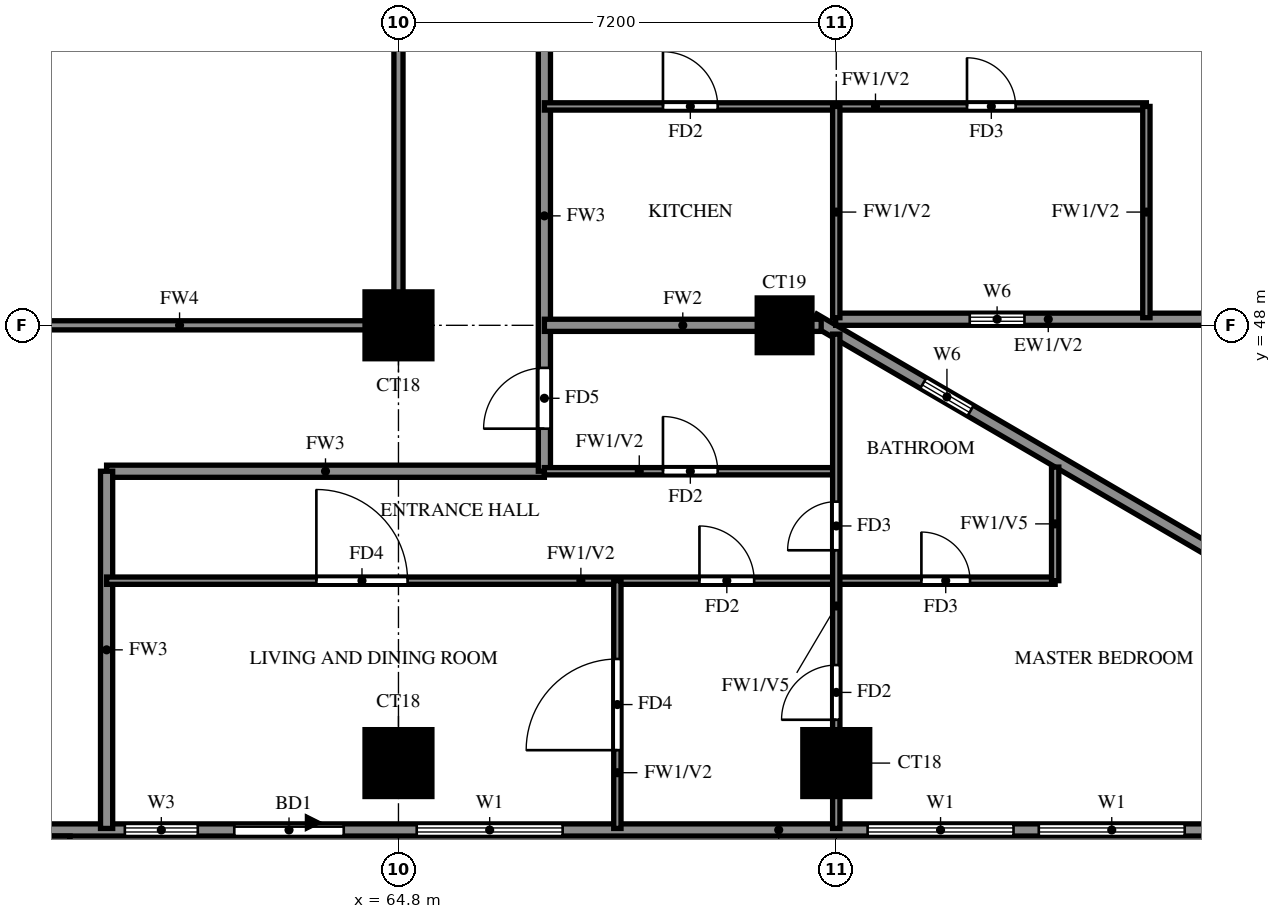
"""IFC4 building model, lengths in metres.
Left out: names, types, materials, properties, quantities, classifications, styles, units other than length and angle.
Written with IfcOpenShell. Run it as: python <this file> out.ifc"""

import sys

from ifc_helpers import new_model, si_unit, direction, frame, frame_2d, origin, origin_2d, place, context, subcontext, project, spatial, rectangle, extrude, source, transform, mapped, element, fill, save


model = new_model("IFC4")
c1 = context("Model", 3, precision=1e-05, world=origin(), true_north=direction((0.0, 1.0)))
c2 = subcontext(c1, "Body", "Model", "MODEL_VIEW")
j1 = project(units=[si_unit("LENGTHUNIT", "METRE"), si_unit("PLANEANGLEUNIT", "RADIAN")], contexts=[c1])
p1 = place(None, origin())
s1 = spatial("IfcSite", under=j1, at=p1, CompositionType="ELEMENT")
p2 = place(p1, origin())
s2 = spatial("IfcBuilding", under=s1, at=p2, CompositionType="ELEMENT")
p3 = place(p2, frame((0.0, 0.0, 113.0)))
s3 = spatial("IfcBuildingStorey", under=s2, at=p3, CompositionType="ELEMENT", Elevation=113.0)
m1 = source(origin(), c2, "Body", "SweptSolid", [
    extrude(rectangle(XDim=1.1, YDim=1.1, at=origin_2d()), origin(), (0.0, 0.0, 1.0), 3.2),
])
for number, where, z_axis, x_axis in (
    (1, (64.8, 40.8, 0.0), (0.0, 0.0, 1.0), (1.0, 0.0, 0.0)),
    (2, (72.0, 40.8, 0.0), (0.0, 0.0, 1.0), (1.0, 0.0, 0.0)),
    (3, (64.8, 48.0, 0.0), (0.0, 0.0, 1.0), (1.0, 0.0, 0.0)),
):
    element("IfcColumn", number, at=place(p3, frame(where, z_axis=z_axis, x_axis=x_axis)), inside=s3, PredefinedType="COLUMN", context=c2, shape_type="MappedRepresentation", body=[
        mapped(m1, transform((0.0, 0.0, 0.0))),
    ])
m2 = source(origin(), c2, "Body", "SweptSolid", [
    extrude(rectangle(XDim=0.9, YDim=0.9, at=origin_2d()), origin(), (0.0, 0.0, 1.0), 3.2),
])
p4 = place(p3, frame((71.15, 48.0, 0.0), z_axis=(0.0, 0.0, 1.0), x_axis=(1.0, 0.0, 0.0)))
e4 = element("IfcColumn", 4, at=p4, inside=s3, PredefinedType="COLUMN", context=c2, shape_type="MappedRepresentation", body=[
    mapped(m2, transform((0.0, 0.0, 0.0))),
])
p5 = place(p3, frame((85.719, 39.881, 0.0), z_axis=(0.0, 0.0, 1.0), x_axis=(-0.86377618652, 0.503875678716, 0.0)))
e5 = element("IfcWall", 5, at=p5, inside=s3, PredefinedType="SOLIDWALL", context=c2, shape_type="SweptSolid", body=[
    extrude(rectangle(XDim=16.311, YDim=0.2, at=frame_2d((8.156, 0.0))), origin(), (0.0, 0.0, 1.0), 3.2),
])
p6 = place(p5, frame((13.326, 0.0, 1.5)))
e6 = element("IfcOpeningElement", 6, at=p6, cuts=e5, PredefinedType="OPENING", context=c2, shape_type="SweptSolid", body=[
    extrude(rectangle(XDim=0.9, YDim=0.9, at=frame_2d((0.45, 0.45))), frame((0.0, 0.11, 0.0), z_axis=(0.0, -1.0, 0.0), x_axis=(1.0, 0.0, 0.0)), (0.0, 0.0, 1.0), 0.22),
])
p7 = place(p3, frame((71.99, 48.1, 0.0), z_axis=(0.0, 0.0, 1.0), x_axis=(1.0, 0.0, 0.0)))
e7 = element("IfcWall", 7, at=p7, inside=s3, PredefinedType="SOLIDWALL", context=c2, shape_type="SweptSolid", body=[
    extrude(rectangle(XDim=6.66, YDim=0.2, at=frame_2d((3.33, 0.0))), origin(), (0.0, 0.0, 1.0), 3.2),
])
p8 = place(p7, frame((2.205, 0.0, 1.5)))
e8 = element("IfcOpeningElement", 8, at=p8, cuts=e7, PredefinedType="OPENING", context=c2, shape_type="SweptSolid", body=[
    extrude(rectangle(XDim=0.9, YDim=0.9, at=frame_2d((0.45, 0.45))), frame((0.0, 0.11, 0.0), z_axis=(0.0, -1.0, 0.0), x_axis=(1.0, 0.0, 0.0)), (0.0, 0.0, 1.0), 0.22),
])
p9 = place(p3, frame((58.8, 39.7, 0.0), z_axis=(0.0, 0.0, 1.0), x_axis=(1.0, 0.0, 0.0)))
e9 = element("IfcWall", 9, at=p9, inside=s3, PredefinedType="SOLIDWALL", context=c2, shape_type="SweptSolid", body=[
    extrude(rectangle(XDim=27.23, YDim=0.2, at=frame_2d((13.615, 0.0))), origin(), (0.0, 0.0, 1.0), 3.2),
])
p10 = place(p9, frame((3.3, 0.0, 0.0)))
e10 = element("IfcOpeningElement", 10, at=p10, cuts=e9, PredefinedType="OPENING", context=c2, shape_type="SweptSolid", body=[
    extrude(rectangle(XDim=1.8, YDim=2.4, at=frame_2d((0.9, 1.2))), frame((0.0, 0.11, 0.0), z_axis=(0.0, -1.0, 0.0), x_axis=(1.0, 0.0, 0.0)), (0.0, 0.0, 1.0), 0.22),
])
p11 = place(p9, frame((1.5, 0.0, 0.6)))
e11 = element("IfcOpeningElement", 11, at=p11, cuts=e9, PredefinedType="OPENING", context=c2, shape_type="SweptSolid", body=[
    extrude(rectangle(XDim=1.2, YDim=2.4, at=frame_2d((0.6, 1.2))), frame((0.0, 0.11, 0.0), z_axis=(0.0, -1.0, 0.0), x_axis=(1.0, 0.0, 0.0)), (0.0, 0.0, 1.0), 0.22),
])
p12 = place(p9, frame((6.3, 0.0, 0.6)))
e12 = element("IfcOpeningElement", 12, at=p12, cuts=e9, PredefinedType="OPENING", context=c2, shape_type="SweptSolid", body=[
    extrude(rectangle(XDim=2.4, YDim=2.4, at=frame_2d((1.2, 1.2))), frame((0.0, 0.11, 0.0), z_axis=(0.0, -1.0, 0.0), x_axis=(1.0, 0.0, 0.0)), (0.0, 0.0, 1.0), 0.22),
])
p13 = place(p9, frame((13.715, 0.0, 0.6)))
e13 = element("IfcOpeningElement", 13, at=p13, cuts=e9, PredefinedType="OPENING", context=c2, shape_type="SweptSolid", body=[
    extrude(rectangle(XDim=2.4, YDim=2.4, at=frame_2d((1.2, 1.2))), frame((0.0, 0.11, 0.0), z_axis=(0.0, -1.0, 0.0), x_axis=(1.0, 0.0, 0.0)), (0.0, 0.0, 1.0), 0.22),
])
p14 = place(p9, frame((16.531, 0.0, 0.6)))
e14 = element("IfcOpeningElement", 14, at=p14, cuts=e9, PredefinedType="OPENING", context=c2, shape_type="SweptSolid", body=[
    extrude(rectangle(XDim=2.4, YDim=2.4, at=frame_2d((1.2, 1.2))), frame((0.0, 0.11, 0.0), z_axis=(0.0, -1.0, 0.0), x_axis=(1.0, 0.0, 0.0)), (0.0, 0.0, 1.0), 0.22),
])
p15 = place(p9, frame((19.346, 0.0, 0.6)))
e15 = element("IfcOpeningElement", 15, at=p15, cuts=e9, PredefinedType="OPENING", context=c2, shape_type="SweptSolid", body=[
    extrude(rectangle(XDim=2.4, YDim=2.4, at=frame_2d((1.2, 1.2))), frame((0.0, 0.11, 0.0), z_axis=(0.0, -1.0, 0.0), x_axis=(1.0, 0.0, 0.0)), (0.0, 0.0, 1.0), 0.22),
])
p16 = place(p9, frame((22.161, 0.0, 0.6)))
e16 = element("IfcOpeningElement", 16, at=p16, cuts=e9, PredefinedType="OPENING", context=c2, shape_type="SweptSolid", body=[
    extrude(rectangle(XDim=2.4, YDim=2.4, at=frame_2d((1.2, 1.2))), frame((0.0, 0.11, 0.0), z_axis=(0.0, -1.0, 0.0), x_axis=(1.0, 0.0, 0.0)), (0.0, 0.0, 1.0), 0.22),
])
p17 = place(p9, frame((26.003, 0.0, 0.6)))
e17 = element("IfcOpeningElement", 17, at=p17, cuts=e9, PredefinedType="OPENING", context=c2, shape_type="SweptSolid", body=[
    extrude(rectangle(XDim=0.9, YDim=2.4, at=frame_2d((0.45, 1.2))), frame((0.0, 0.11, 0.0), z_axis=(0.0, -1.0, 0.0), x_axis=(1.0, 0.0, 0.0)), (0.0, 0.0, 1.0), 0.22),
])
p18 = place(p3, frame((58.5, 37.2, 0.0), z_axis=(0.0, 0.0, 1.0), x_axis=(0.0, 1.0, 0.0)))
e18 = element("IfcWall", 18, at=p18, inside=s3, PredefinedType="SOLIDWALL", context=c2, shape_type="SweptSolid", body=[
    extrude(rectangle(XDim=2.4, YDim=1.8, at=frame_2d((1.2, 0.0))), origin(), (0.0, 0.0, 1.0), 3.2),
])
p19 = place(p3, frame((60.0, 45.6, 0.0), z_axis=(0.0, 0.0, 1.0), x_axis=(1.0, 0.0, 0.0)))
e19 = element("IfcWall", 19, at=p19, inside=s3, PredefinedType="SOLIDWALL", context=c2, shape_type="SweptSolid", body=[
    extrude(rectangle(XDim=7.2, YDim=0.2, at=frame_2d((3.6, 0.0))), origin(), (0.0, 0.0, 1.0), 3.2),
])
p20 = place(p3, frame((60.0, 39.725, 0.0), z_axis=(0.0, 0.0, 1.0), x_axis=(0.0, 1.0, 0.0)))
e20 = element("IfcWall", 20, at=p20, inside=s3, PredefinedType="SOLIDWALL", context=c2, shape_type="SweptSolid", body=[
    extrude(rectangle(XDim=5.875, YDim=0.2, at=frame_2d((2.938, 0.0))), origin(), (0.0, 0.0, 1.0), 3.2),
])
p21 = place(p3, frame((67.2, 45.6, 0.0), z_axis=(0.0, 0.0, 1.0), x_axis=(0.0, 1.0, 0.0)))
e21 = element("IfcWall", 21, at=p21, inside=s3, PredefinedType="SOLIDWALL", context=c2, shape_type="SweptSolid", body=[
    extrude(rectangle(XDim=8.4, YDim=0.2, at=frame_2d((4.2, 0.0))), origin(), (0.0, 0.0, 1.0), 3.2),
])
p22 = place(p21, frame((0.7, 0.0, 0.0)))
e22 = element("IfcOpeningElement", 22, at=p22, cuts=e21, PredefinedType="OPENING", context=c2, shape_type="SweptSolid", body=[
    extrude(rectangle(XDim=1.0, YDim=2.1, at=frame_2d((0.5, 1.05))), frame((0.0, 0.11, 0.0), z_axis=(0.0, -1.0, 0.0), x_axis=(1.0, 0.0, 0.0)), (0.0, 0.0, 1.0), 0.22),
])
p23 = place(p3, frame((67.2, 48.0, 0.0), z_axis=(0.0, 0.0, 1.0), x_axis=(1.0, 0.0, 0.0)))
e23 = element("IfcWall", 23, at=p23, inside=s3, PredefinedType="SOLIDWALL", context=c2, shape_type="SweptSolid", body=[
    extrude(rectangle(XDim=4.552, YDim=0.2, at=frame_2d((2.276, 0.0))), origin(), (0.0, 0.0, 1.0), 3.2),
])
p24 = place(p3, frame((60.0, 43.8, 0.0), z_axis=(0.0, 0.0, 1.0), x_axis=(1.0, 0.0, 0.0)))
e24 = element("IfcWall", 24, at=p24, inside=s3, PredefinedType="PARTITIONING", context=c2, shape_type="SweptSolid", body=[
    extrude(rectangle(XDim=15.6, YDim=0.12, at=frame_2d((7.8, 0.0))), origin(), (0.0, 0.0, 1.0), 3.2),
])
p25 = place(p24, frame((9.75, 0.0, 0.0)))
e25 = element("IfcOpeningElement", 25, at=p25, cuts=e24, PredefinedType="OPENING", context=c2, shape_type="SweptSolid", body=[
    extrude(rectangle(XDim=0.9, YDim=2.1, at=frame_2d((0.45, 1.05))), frame((0.0, 0.07, 0.0), z_axis=(0.0, -1.0, 0.0), x_axis=(1.0, 0.0, 0.0)), (0.0, 0.0, 1.0), 0.14),
])
p26 = place(p24, frame((3.45, 0.0, 0.0)))
e26 = element("IfcOpeningElement", 26, at=p26, cuts=e24, PredefinedType="OPENING", context=c2, shape_type="SweptSolid", body=[
    extrude(rectangle(XDim=1.5, YDim=2.1, at=frame_2d((0.75, 1.05))), frame((0.0, 0.07, 0.0), z_axis=(0.0, -1.0, 0.0), x_axis=(1.0, 0.0, 0.0)), (0.0, 0.0, 1.0), 0.14),
])
p27 = place(p24, frame((13.4, 0.0, 0.0)))
e27 = element("IfcOpeningElement", 27, at=p27, cuts=e24, PredefinedType="OPENING", context=c2, shape_type="SweptSolid", body=[
    extrude(rectangle(XDim=0.8, YDim=2.1, at=frame_2d((0.4, 1.05))), frame((0.0, 0.07, 0.0), z_axis=(0.0, -1.0, 0.0), x_axis=(1.0, 0.0, 0.0)), (0.0, 0.0, 1.0), 0.14),
])
p28 = place(p3, frame((67.2, 45.6, 0.0), z_axis=(0.0, 0.0, 1.0), x_axis=(1.0, 0.0, 0.0)))
e28 = element("IfcWall", 28, at=p28, inside=s3, PredefinedType="PARTITIONING", context=c2, shape_type="SweptSolid", body=[
    extrude(rectangle(XDim=4.8, YDim=0.12, at=frame_2d((2.4, 0.0))), origin(), (0.0, 0.0, 1.0), 3.2),
])
p29 = place(p28, frame((1.95, 0.0, 0.0)))
e29 = element("IfcOpeningElement", 29, at=p29, cuts=e28, PredefinedType="OPENING", context=c2, shape_type="SweptSolid", body=[
    extrude(rectangle(XDim=0.9, YDim=2.1, at=frame_2d((0.45, 1.05))), frame((0.0, 0.07, 0.0), z_axis=(0.0, -1.0, 0.0), x_axis=(1.0, 0.0, 0.0)), (0.0, 0.0, 1.0), 0.14),
])
p30 = place(p3, frame((67.2, 51.6, 0.0), z_axis=(0.0, 0.0, 1.0), x_axis=(1.0, 0.0, 0.0)))
e30 = element("IfcWall", 30, at=p30, inside=s3, PredefinedType="PARTITIONING", context=c2, shape_type="SweptSolid", body=[
    extrude(rectangle(XDim=9.9, YDim=0.12, at=frame_2d((4.95, 0.0))), origin(), (0.0, 0.0, 1.0), 3.2),
])
p31 = place(p30, frame((6.95, 0.0, 0.0)))
e31 = element("IfcOpeningElement", 31, at=p31, cuts=e30, PredefinedType="OPENING", context=c2, shape_type="SweptSolid", body=[
    extrude(rectangle(XDim=0.8, YDim=2.1, at=frame_2d((0.4, 1.05))), frame((0.0, 0.07, 0.0), z_axis=(0.0, -1.0, 0.0), x_axis=(1.0, 0.0, 0.0)), (0.0, 0.0, 1.0), 0.14),
])
p32 = place(p30, frame((1.95, 0.0, 0.0)))
e32 = element("IfcOpeningElement", 32, at=p32, cuts=e30, PredefinedType="OPENING", context=c2, shape_type="SweptSolid", body=[
    extrude(rectangle(XDim=0.9, YDim=2.1, at=frame_2d((0.45, 1.05))), frame((0.0, 0.07, 0.0), z_axis=(0.0, -1.0, 0.0), x_axis=(1.0, 0.0, 0.0)), (0.0, 0.0, 1.0), 0.14),
])
p33 = place(p3, frame((68.4, 39.725, 0.0), z_axis=(0.0, 0.0, 1.0), x_axis=(0.0, 1.0, 0.0)))
e33 = element("IfcWall", 33, at=p33, inside=s3, PredefinedType="PARTITIONING", context=c2, shape_type="SweptSolid", body=[
    extrude(rectangle(XDim=4.075, YDim=0.12, at=frame_2d((2.038, 0.0))), origin(), (0.0, 0.0, 1.0), 3.2),
])
p34 = place(p33, frame((1.288, 0.0, 0.0)))
e34 = element("IfcOpeningElement", 34, at=p34, cuts=e33, PredefinedType="OPENING", context=c2, shape_type="SweptSolid", body=[
    extrude(rectangle(XDim=1.5, YDim=2.1, at=frame_2d((0.75, 1.05))), frame((0.0, 0.07, 0.0), z_axis=(0.0, -1.0, 0.0), x_axis=(1.0, 0.0, 0.0)), (0.0, 0.0, 1.0), 0.14),
])
p35 = place(p3, frame((72.0, 39.725, 0.0), z_axis=(0.0, 0.0, 1.0), x_axis=(0.0, 1.0, 0.0)))
e35 = element("IfcWall", 35, at=p35, inside=s3, PredefinedType="PARTITIONING", context=c2, shape_type="SweptSolid", body=[
    extrude(rectangle(XDim=8.13, YDim=0.12, at=frame_2d((4.065, 0.0))), origin(), (0.0, 0.0, 1.0), 2.3),
])
p36 = place(p35, frame((1.788, 0.0, 0.0)))
e36 = element("IfcOpeningElement", 36, at=p36, cuts=e35, PredefinedType="OPENING", context=c2, shape_type="SweptSolid", body=[
    extrude(rectangle(XDim=0.9, YDim=2.1, at=frame_2d((0.45, 1.05))), frame((0.0, 0.07, 0.0), z_axis=(0.0, -1.0, 0.0), x_axis=(1.0, 0.0, 0.0)), (0.0, 0.0, 1.0), 0.14),
])
p37 = place(p35, frame((4.575, 0.0, 0.0)))
e37 = element("IfcOpeningElement", 37, at=p37, cuts=e35, PredefinedType="OPENING", context=c2, shape_type="SweptSolid", body=[
    extrude(rectangle(XDim=0.8, YDim=2.1, at=frame_2d((0.4, 1.05))), frame((0.0, 0.07, 0.0), z_axis=(0.0, -1.0, 0.0), x_axis=(1.0, 0.0, 0.0)), (0.0, 0.0, 1.0), 0.14),
])
p38 = place(p3, frame((72.0, 48.125, 0.0), z_axis=(0.0, 0.0, 1.0), x_axis=(0.0, 1.0, 0.0)))
e38 = element("IfcWall", 38, at=p38, inside=s3, PredefinedType="PARTITIONING", context=c2, shape_type="SweptSolid", body=[
    extrude(rectangle(XDim=3.475, YDim=0.12, at=frame_2d((1.738, 0.0))), origin(), (0.0, 0.0, 1.0), 3.2),
])
p39 = place(p3, frame((75.6, 43.8, 0.0), z_axis=(0.0, 0.0, 1.0), x_axis=(0.0, 1.0, 0.0)))
e39 = element("IfcWall", 39, at=p39, inside=s3, PredefinedType="PARTITIONING", context=c2, shape_type="SweptSolid", body=[
    extrude(rectangle(XDim=1.868, YDim=0.12, at=frame_2d((0.934, 0.0))), origin(), (0.0, 0.0, 1.0), 2.3),
])
p40 = place(p3, frame((77.1, 48.125, 0.0), z_axis=(0.0, 0.0, 1.0), x_axis=(0.0, 1.0, 0.0)))
e40 = element("IfcWall", 40, at=p40, inside=s3, PredefinedType="PARTITIONING", context=c2, shape_type="SweptSolid", body=[
    extrude(rectangle(XDim=3.475, YDim=0.12, at=frame_2d((1.738, 0.0))), origin(), (0.0, 0.0, 1.0), 3.2),
])
p41 = place(p3, frame((57.6, 48.0, 0.0), z_axis=(0.0, 0.0, 1.0), x_axis=(1.0, 0.0, 0.0)))
e41 = element("IfcWall", 41, at=p41, inside=s3, PredefinedType="SOLIDWALL", context=c2, shape_type="SweptSolid", body=[
    extrude(rectangle(XDim=7.2, YDim=0.15, at=frame_2d((3.6, 0.0))), origin(), (0.0, 0.0, 1.0), 2.3),
])
p42 = place(p3, frame((64.8, 48.0, 0.0), z_axis=(0.0, 0.0, 1.0), x_axis=(0.0, 1.0, 0.0)))
e42 = element("IfcWall", 42, at=p42, inside=s3, PredefinedType="SOLIDWALL", context=c2, shape_type="SweptSolid", body=[
    extrude(rectangle(XDim=14.4, YDim=0.15, at=frame_2d((7.2, 0.0))), origin(), (0.0, 0.0, 1.0), 2.3),
])
p43 = place(p6, origin())
e43 = element("IfcWindow", 43, at=p43, inside=s3, PartitioningType="SINGLE_PANEL", PredefinedType="WINDOW", context=c2, shape_type="SweptSolid", body=[
    extrude(rectangle(XDim=0.9, YDim=0.9, at=frame_2d((0.45, 0.45))), frame((0.0, 0.03, 0.0), z_axis=(0.0, -1.0, 0.0), x_axis=(1.0, 0.0, 0.0)), (0.0, 0.0, 1.0), 0.06),
])
fill(e6, e43)
p44 = place(p8, origin())
e44 = element("IfcWindow", 44, at=p44, inside=s3, PartitioningType="SINGLE_PANEL", PredefinedType="WINDOW", context=c2, shape_type="SweptSolid", body=[
    extrude(rectangle(XDim=0.9, YDim=0.9, at=frame_2d((0.45, 0.45))), frame((0.0, 0.03, 0.0), z_axis=(0.0, -1.0, 0.0), x_axis=(1.0, 0.0, 0.0)), (0.0, 0.0, 1.0), 0.06),
])
fill(e8, e44)
p45 = place(p10, origin())
e45 = element("IfcDoor", 45, at=p45, inside=s3, OperationType="DOUBLE_DOOR_SLIDING", PredefinedType="DOOR", context=c2, shape_type="SweptSolid", body=[
    extrude(rectangle(XDim=1.8, YDim=2.4, at=frame_2d((0.9, 1.2))), frame((0.0, 0.025, 0.0), z_axis=(0.0, -1.0, 0.0), x_axis=(1.0, 0.0, 0.0)), (0.0, 0.0, 1.0), 0.05),
])
fill(e10, e45)
p46 = place(p11, origin())
e46 = element("IfcWindow", 46, at=p46, inside=s3, PartitioningType="SINGLE_PANEL", PredefinedType="WINDOW", context=c2, shape_type="SweptSolid", body=[
    extrude(rectangle(XDim=1.2, YDim=2.4, at=frame_2d((0.6, 1.2))), frame((0.0, 0.03, 0.0), z_axis=(0.0, -1.0, 0.0), x_axis=(1.0, 0.0, 0.0)), (0.0, 0.0, 1.0), 0.06),
])
fill(e11, e46)
p47 = place(p12, origin())
e47 = element("IfcWindow", 47, at=p47, inside=s3, PartitioningType="DOUBLE_PANEL_VERTICAL", PredefinedType="WINDOW", context=c2, shape_type="SweptSolid", body=[
    extrude(rectangle(XDim=2.4, YDim=2.4, at=frame_2d((1.2, 1.2))), frame((0.0, 0.03, 0.0), z_axis=(0.0, -1.0, 0.0), x_axis=(1.0, 0.0, 0.0)), (0.0, 0.0, 1.0), 0.06),
])
fill(e12, e47)
p48 = place(p13, origin())
e48 = element("IfcWindow", 48, at=p48, inside=s3, PartitioningType="DOUBLE_PANEL_VERTICAL", PredefinedType="WINDOW", context=c2, shape_type="SweptSolid", body=[
    extrude(rectangle(XDim=2.4, YDim=2.4, at=frame_2d((1.2, 1.2))), frame((0.0, 0.03, 0.0), z_axis=(0.0, -1.0, 0.0), x_axis=(1.0, 0.0, 0.0)), (0.0, 0.0, 1.0), 0.06),
])
fill(e13, e48)
p49 = place(p14, origin())
e49 = element("IfcWindow", 49, at=p49, inside=s3, PartitioningType="DOUBLE_PANEL_VERTICAL", PredefinedType="WINDOW", context=c2, shape_type="SweptSolid", body=[
    extrude(rectangle(XDim=2.4, YDim=2.4, at=frame_2d((1.2, 1.2))), frame((0.0, 0.03, 0.0), z_axis=(0.0, -1.0, 0.0), x_axis=(1.0, 0.0, 0.0)), (0.0, 0.0, 1.0), 0.06),
])
fill(e14, e49)
p50 = place(p31, origin())
e50 = element("IfcDoor", 50, at=p50, inside=s3, OperationType="SINGLE_SWING_LEFT", PredefinedType="DOOR", context=c2, shape_type="SweptSolid", body=[
    extrude(rectangle(XDim=0.8, YDim=2.1, at=frame_2d((0.4, 1.05))), frame((0.0, 0.025, 0.0), z_axis=(0.0, -1.0, 0.0), x_axis=(1.0, 0.0, 0.0)), (0.0, 0.0, 1.0), 0.05),
])
fill(e31, e50)
p51 = place(p32, origin())
e51 = element("IfcDoor", 51, at=p51, inside=s3, OperationType="SINGLE_SWING_LEFT", PredefinedType="DOOR", context=c2, shape_type="SweptSolid", body=[
    extrude(rectangle(XDim=0.9, YDim=2.1, at=frame_2d((0.45, 1.05))), frame((0.0, 0.025, 0.0), z_axis=(0.0, -1.0, 0.0), x_axis=(1.0, 0.0, 0.0)), (0.0, 0.0, 1.0), 0.05),
])
fill(e32, e51)
p52 = place(p34, origin())
e52 = element("IfcDoor", 52, at=p52, inside=s3, OperationType="SINGLE_SWING_RIGHT", PredefinedType="DOOR", context=c2, shape_type="SweptSolid", body=[
    extrude(rectangle(XDim=1.5, YDim=2.1, at=frame_2d((0.75, 1.05))), frame((0.0, 0.025, 0.0), z_axis=(0.0, -1.0, 0.0), x_axis=(1.0, 0.0, 0.0)), (0.0, 0.0, 1.0), 0.05),
])
fill(e34, e52)
p53 = place(p29, origin())
e53 = element("IfcDoor", 53, at=p53, inside=s3, OperationType="SINGLE_SWING_LEFT", PredefinedType="DOOR", context=c2, shape_type="SweptSolid", body=[
    extrude(rectangle(XDim=0.9, YDim=2.1, at=frame_2d((0.45, 1.05))), frame((0.0, 0.025, 0.0), z_axis=(0.0, -1.0, 0.0), x_axis=(1.0, 0.0, 0.0)), (0.0, 0.0, 1.0), 0.05),
])
fill(e29, e53)
p54 = place(p22, origin())
e54 = element("IfcDoor", 54, at=p54, inside=s3, OperationType="SINGLE_SWING_LEFT", PredefinedType="DOOR", context=c2, shape_type="SweptSolid", body=[
    extrude(rectangle(XDim=1.0, YDim=2.1, at=frame_2d((0.5, 1.05))), frame((0.0, 0.025, 0.0), z_axis=(0.0, -1.0, 0.0), x_axis=(1.0, 0.0, 0.0)), (0.0, 0.0, 1.0), 0.05),
])
fill(e22, e54)
p55 = place(p25, origin())
e55 = element("IfcDoor", 55, at=p55, inside=s3, OperationType="SINGLE_SWING_RIGHT", PredefinedType="DOOR", context=c2, shape_type="SweptSolid", body=[
    extrude(rectangle(XDim=0.9, YDim=2.1, at=frame_2d((0.45, 1.05))), frame((0.0, 0.025, 0.0), z_axis=(0.0, -1.0, 0.0), x_axis=(1.0, 0.0, 0.0)), (0.0, 0.0, 1.0), 0.05),
])
fill(e25, e55)
p56 = place(p26, origin())
e56 = element("IfcDoor", 56, at=p56, inside=s3, OperationType="SINGLE_SWING_LEFT", PredefinedType="DOOR", context=c2, shape_type="SweptSolid", body=[
    extrude(rectangle(XDim=1.5, YDim=2.1, at=frame_2d((0.75, 1.05))), frame((0.0, 0.025, 0.0), z_axis=(0.0, -1.0, 0.0), x_axis=(1.0, 0.0, 0.0)), (0.0, 0.0, 1.0), 0.05),
])
fill(e26, e56)
p57 = place(p36, origin())
e57 = element("IfcDoor", 57, at=p57, inside=s3, OperationType="SINGLE_SWING_RIGHT", PredefinedType="DOOR", context=c2, shape_type="SweptSolid", body=[
    extrude(rectangle(XDim=0.9, YDim=2.1, at=frame_2d((0.45, 1.05))), frame((0.0, 0.025, 0.0), z_axis=(0.0, -1.0, 0.0), x_axis=(1.0, 0.0, 0.0)), (0.0, 0.0, 1.0), 0.05),
])
fill(e36, e57)
p58 = place(p37, origin())
e58 = element("IfcDoor", 58, at=p58, inside=s3, OperationType="SINGLE_SWING_RIGHT", PredefinedType="DOOR", context=c2, shape_type="SweptSolid", body=[
    extrude(rectangle(XDim=0.8, YDim=2.1, at=frame_2d((0.4, 1.05))), frame((0.0, 0.025, 0.0), z_axis=(0.0, -1.0, 0.0), x_axis=(1.0, 0.0, 0.0)), (0.0, 0.0, 1.0), 0.05),
])
fill(e37, e58)
p59 = place(p27, origin())
e59 = element("IfcDoor", 59, at=p59, inside=s3, OperationType="SINGLE_SWING_LEFT", PredefinedType="DOOR", context=c2, shape_type="SweptSolid", body=[
    extrude(rectangle(XDim=0.8, YDim=2.1, at=frame_2d((0.4, 1.05))), frame((0.0, 0.025, 0.0), z_axis=(0.0, -1.0, 0.0), x_axis=(1.0, 0.0, 0.0)), (0.0, 0.0, 1.0), 0.05),
])
fill(e27, e59)
save(model, sys.argv[1])
